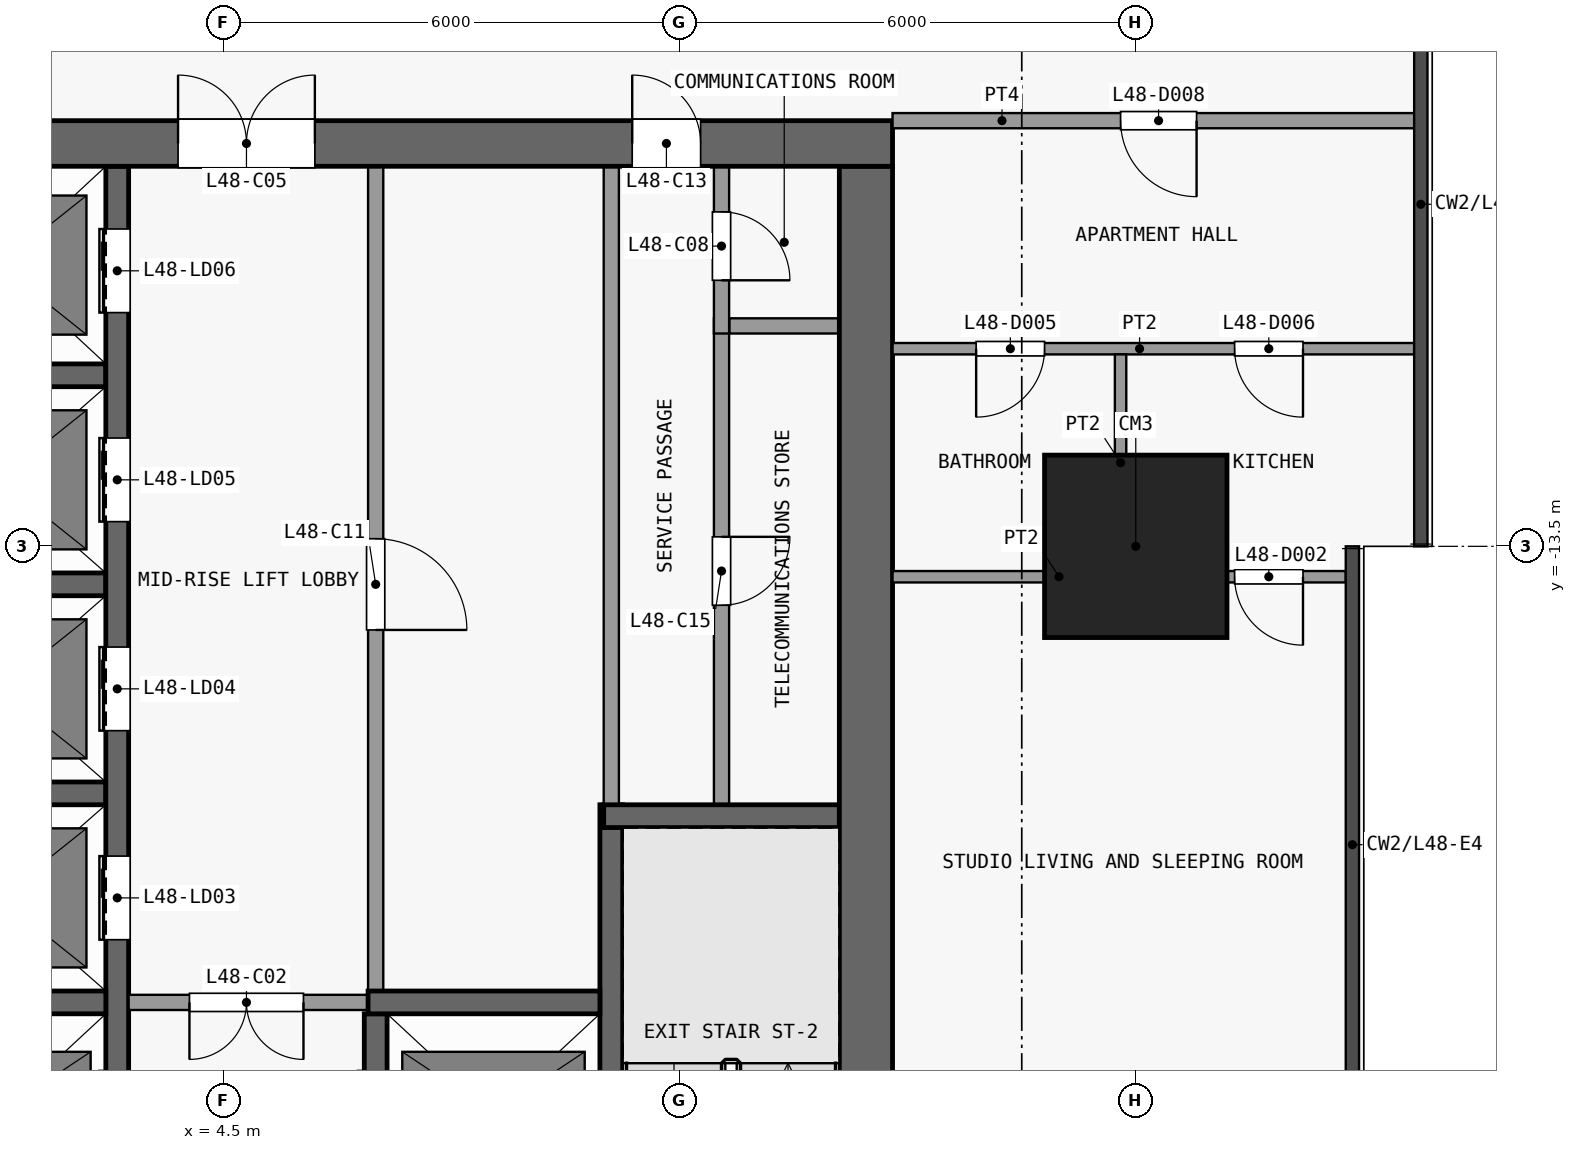
"""IFC4 building model, lengths in metres.
Left out: names, types, materials, properties, quantities, classifications, styles, units other than length and angle.
Written with IfcOpenShell. Run it as: python <this file> out.ifc"""

import sys

from ifc_helpers import new_model, si_unit, direction, frame, frame_2d, origin, origin_2d, place, context, subcontext, project, spatial, rectangle, extrude, element, fill, save


model = new_model("IFC4")
c1 = context("Model", 3, precision=1e-05, world=origin(), true_north=direction((0.0, 1.0)))
c2 = subcontext(c1, "Body", "Model", "MODEL_VIEW")
j1 = project(units=[si_unit("LENGTHUNIT", "METRE"), si_unit("PLANEANGLEUNIT", "RADIAN")], contexts=[c1])
p1 = place(None, origin())
s1 = spatial("IfcSite", under=j1, at=p1, CompositionType="ELEMENT")
p2 = place(p1, origin())
s2 = spatial("IfcBuilding", under=s1, at=p2, CompositionType="ELEMENT")
p3 = place(p2, frame((0.0, 0.0, 192.5)))
s3 = spatial("IfcBuildingStorey", under=s2, at=p3, CompositionType="ELEMENT", Elevation=192.5)
p4 = place(p3, frame((16.5, -13.5, 0.0), z_axis=(0.0, 0.0, 1.0), x_axis=(1.0, 0.0, 0.0)))
e1 = element("IfcColumn", 1, at=p4, inside=s3, PredefinedType="COLUMN", context=c2, shape_type="SweptSolid", body=[
    extrude(rectangle(XDim=2.4, YDim=2.4, at=origin_2d()), origin(), (0.0, 0.0, 1.0), 3.6),
])
p5 = place(p3, frame((-13.3, -8.2, 0.0), z_axis=(0.0, 0.0, 1.0), x_axis=(1.0, 0.0, 0.0)))
e2 = element("IfcWall", 2, at=p5, inside=s3, PredefinedType="SHEAR", context=c2, shape_type="SweptSolid", body=[
    extrude(rectangle(XDim=26.6, YDim=0.6, at=frame_2d((13.3, 0.0))), origin(), (0.0, 0.0, 1.0), 3.3),
])
p6 = place(p5, frame((7.6, 0.0, 0.0)))
e3 = element("IfcOpeningElement", 3, at=p6, cuts=e2, PredefinedType="OPENING", context=c2, shape_type="SweptSolid", body=[
    extrude(rectangle(XDim=1.8, YDim=2.1, at=frame_2d((0.9, 1.05))), frame((0.0, 0.31, 0.0), z_axis=(0.0, -1.0, 0.0), x_axis=(1.0, 0.0, 0.0)), (0.0, 0.0, 1.0), 0.62),
])
p7 = place(p5, frame((17.2, 0.0, 0.0)))
e4 = element("IfcOpeningElement", 4, at=p7, cuts=e2, PredefinedType="OPENING", context=c2, shape_type="SweptSolid", body=[
    extrude(rectangle(XDim=1.8, YDim=2.1, at=frame_2d((0.9, 1.05))), frame((0.0, 0.31, 0.0), z_axis=(0.0, -1.0, 0.0), x_axis=(1.0, 0.0, 0.0)), (0.0, 0.0, 1.0), 0.62),
])
p8 = place(p5, frame((2.525, 0.0, 0.0)))
e5 = element("IfcOpeningElement", 5, at=p8, cuts=e2, PredefinedType="OPENING", context=c2, shape_type="SweptSolid", body=[
    extrude(rectangle(XDim=0.9, YDim=2.1, at=frame_2d((0.45, 1.05))), frame((0.0, 0.31, 0.0), z_axis=(0.0, -1.0, 0.0), x_axis=(1.0, 0.0, 0.0)), (0.0, 0.0, 1.0), 0.62),
])
p9 = place(p5, frame((23.175, 0.0, 0.0)))
e6 = element("IfcOpeningElement", 6, at=p9, cuts=e2, PredefinedType="OPENING", context=c2, shape_type="SweptSolid", body=[
    extrude(rectangle(XDim=0.9, YDim=2.1, at=frame_2d((0.45, 1.05))), frame((0.0, 0.31, 0.0), z_axis=(0.0, -1.0, 0.0), x_axis=(1.0, 0.0, 0.0)), (0.0, 0.0, 1.0), 0.62),
])
p10 = place(p3, frame((12.95, -24.6, 0.0), z_axis=(0.0, 0.0, 1.0), x_axis=(0.0, 1.0, 0.0)))
e7 = element("IfcWall", 7, at=p10, inside=s3, PredefinedType="SHEAR", context=c2, shape_type="SweptSolid", body=[
    extrude(rectangle(XDim=16.1, YDim=0.7, at=frame_2d((8.05, 0.0))), origin(), (0.0, 0.0, 1.0), 3.3),
])
p11 = place(p3, frame((0.15, -19.5, 0.0), z_axis=(0.0, 0.0, 1.0), x_axis=(1.0, 0.0, 0.0)))
e8 = element("IfcWall", 8, at=p11, inside=s3, PredefinedType="SHEAR", context=c2, shape_type="SweptSolid", body=[
    extrude(rectangle(XDim=2.8, YDim=0.3, at=frame_2d((1.4, 0.0))), origin(), (0.0, 0.0, 1.0), 3.3),
])
p12 = place(p3, frame((6.4, -19.5, 0.0), z_axis=(0.0, 0.0, 1.0), x_axis=(-1.0, 0.0, 0.0)))
e9 = element("IfcWall", 9, at=p12, inside=s3, PredefinedType="PARTITIONING", context=c2, shape_type="SweptSolid", body=[
    extrude(rectangle(XDim=3.15, YDim=0.2, at=frame_2d((1.575, 0.0))), origin(), (0.0, 0.0, 1.0), 3.3),
])
p13 = place(p12, frame((0.85, 0.0, 0.0)))
e10 = element("IfcOpeningElement", 10, at=p13, cuts=e9, PredefinedType="OPENING", context=c2, shape_type="SweptSolid", body=[
    extrude(rectangle(XDim=1.5, YDim=2.1, at=frame_2d((0.75, 1.05))), frame((0.0, 0.11, 0.0), z_axis=(0.0, -1.0, 0.0), x_axis=(1.0, 0.0, 0.0)), (0.0, 0.0, 1.0), 0.22),
])
p14 = place(p3, frame((6.4, -19.5, 0.0), z_axis=(0.0, 0.0, 1.0), x_axis=(1.0, 0.0, 0.0)))
e11 = element("IfcWall", 11, at=p14, inside=s3, PredefinedType="SHEAR", context=c2, shape_type="SweptSolid", body=[
    extrude(rectangle(XDim=3.05, YDim=0.3, at=frame_2d((1.525, 0.0))), origin(), (0.0, 0.0, 1.0), 3.3),
])
p15 = place(p3, frame((9.5, -17.05, 0.0), z_axis=(0.0, 0.0, 1.0), x_axis=(1.0, 0.0, 0.0)))
e12 = element("IfcWall", 12, at=p15, inside=s3, PredefinedType="SHEAR", context=c2, shape_type="SweptSolid", body=[
    extrude(rectangle(XDim=3.1, YDim=0.3, at=frame_2d((1.55, 0.0))), origin(), (0.0, 0.0, 1.0), 3.3),
])
for number, where, z_axis, x_axis in (
    (13, (0.15, -16.75, 0.0), (0.0, 0.0, 1.0), (1.0, 0.0, 0.0)),
    (14, (0.15, -14.0, 0.0), (0.0, 0.0, 1.0), (1.0, 0.0, 0.0)),
    (15, (0.15, -11.25, 0.0), (0.0, 0.0, 1.0), (1.0, 0.0, 0.0)),
):
    element("IfcWall", number, at=place(p3, frame(where, z_axis=z_axis, x_axis=x_axis)), inside=s3, PredefinedType="SHEAR", context=c2, shape_type="SweptSolid", body=[
        extrude(rectangle(XDim=2.8, YDim=0.3, at=frame_2d((1.4, 0.0))), origin(), (0.0, 0.0, 1.0), 3.3),
    ])
p16 = place(p3, frame((11.15, -10.6, 0.0), z_axis=(0.0, 0.0, 1.0), x_axis=(1.0, 0.0, 0.0)))
e16 = element("IfcWall", 16, at=p16, inside=s3, PredefinedType="PARTITIONING", context=c2, shape_type="SweptSolid", body=[
    extrude(rectangle(XDim=1.45, YDim=0.2, at=frame_2d((0.725, 0.0))), origin(), (0.0, 0.0, 1.0), 3.3),
])
p17 = place(p3, frame((3.1, -22.55, 0.0), z_axis=(0.0, 0.0, 1.0), x_axis=(0.0, 1.0, 0.0)))
e17 = element("IfcWall", 17, at=p17, inside=s3, PredefinedType="SHEAR", context=c2, shape_type="SweptSolid", body=[
    extrude(rectangle(XDim=14.05, YDim=0.3, at=frame_2d((7.025, 0.0))), origin(), (0.0, 0.0, 1.0), 3.3),
])
p18 = place(p17, frame((1.05, 0.0, 0.0)))
e18 = element("IfcOpeningElement", 18, at=p18, cuts=e17, PredefinedType="OPENING", context=c2, shape_type="SweptSolid", body=[
    extrude(rectangle(XDim=1.1, YDim=2.1, at=frame_2d((0.55, 1.05))), frame((0.0, 0.16, 0.0), z_axis=(0.0, -1.0, 0.0), x_axis=(1.0, 0.0, 0.0)), (0.0, 0.0, 1.0), 0.32),
])
p19 = place(p17, frame((3.875, 0.0, 0.0)))
e19 = element("IfcOpeningElement", 19, at=p19, cuts=e17, PredefinedType="OPENING", context=c2, shape_type="SweptSolid", body=[
    extrude(rectangle(XDim=1.1, YDim=2.1, at=frame_2d((0.55, 1.05))), frame((0.0, 0.16, 0.0), z_axis=(0.0, -1.0, 0.0), x_axis=(1.0, 0.0, 0.0)), (0.0, 0.0, 1.0), 0.32),
])
p20 = place(p17, frame((6.625, 0.0, 0.0)))
e20 = element("IfcOpeningElement", 20, at=p20, cuts=e17, PredefinedType="OPENING", context=c2, shape_type="SweptSolid", body=[
    extrude(rectangle(XDim=1.1, YDim=2.1, at=frame_2d((0.55, 1.05))), frame((0.0, 0.16, 0.0), z_axis=(0.0, -1.0, 0.0), x_axis=(1.0, 0.0, 0.0)), (0.0, 0.0, 1.0), 0.32),
])
p21 = place(p17, frame((9.375, 0.0, 0.0)))
e21 = element("IfcOpeningElement", 21, at=p21, cuts=e17, PredefinedType="OPENING", context=c2, shape_type="SweptSolid", body=[
    extrude(rectangle(XDim=1.1, YDim=2.1, at=frame_2d((0.55, 1.05))), frame((0.0, 0.16, 0.0), z_axis=(0.0, -1.0, 0.0), x_axis=(1.0, 0.0, 0.0)), (0.0, 0.0, 1.0), 0.32),
])
p22 = place(p17, frame((12.125, 0.0, 0.0)))
e22 = element("IfcOpeningElement", 22, at=p22, cuts=e17, PredefinedType="OPENING", context=c2, shape_type="SweptSolid", body=[
    extrude(rectangle(XDim=1.1, YDim=2.1, at=frame_2d((0.55, 1.05))), frame((0.0, 0.16, 0.0), z_axis=(0.0, -1.0, 0.0), x_axis=(1.0, 0.0, 0.0)), (0.0, 0.0, 1.0), 0.32),
])
p23 = place(p3, frame((6.5, -22.25, 0.0), z_axis=(0.0, 0.0, 1.0), x_axis=(0.0, 1.0, 0.0)))
e23 = element("IfcWall", 23, at=p23, inside=s3, PredefinedType="SHEAR", context=c2, shape_type="SweptSolid", body=[
    extrude(rectangle(XDim=2.6, YDim=0.3, at=frame_2d((1.3, 0.0))), origin(), (0.0, 0.0, 1.0), 3.3),
])
p24 = place(p23, frame((0.75, 0.0, 0.0)))
e24 = element("IfcOpeningElement", 24, at=p24, cuts=e23, PredefinedType="OPENING", context=c2, shape_type="SweptSolid", body=[
    extrude(rectangle(XDim=1.1, YDim=2.1, at=frame_2d((0.55, 1.05))), frame((0.0, 0.16, 0.0), z_axis=(0.0, -1.0, 0.0), x_axis=(1.0, 0.0, 0.0)), (0.0, 0.0, 1.0), 0.32),
])
p25 = place(p3, frame((6.5, -8.5, 0.0), z_axis=(0.0, 0.0, 1.0), x_axis=(0.0, -1.0, 0.0)))
e25 = element("IfcWall", 25, at=p25, inside=s3, PredefinedType="PARTITIONING", context=c2, shape_type="SweptSolid", body=[
    extrude(rectangle(XDim=10.85, YDim=0.2, at=frame_2d((5.425, 0.0))), origin(), (0.0, 0.0, 1.0), 3.3),
])
p26 = place(p25, frame((4.9, 0.0, 0.0)))
e26 = element("IfcOpeningElement", 26, at=p26, cuts=e25, PredefinedType="OPENING", context=c2, shape_type="SweptSolid", body=[
    extrude(rectangle(XDim=1.2, YDim=2.1, at=frame_2d((0.6, 1.05))), frame((0.0, 0.11, 0.0), z_axis=(0.0, -1.0, 0.0), x_axis=(1.0, 0.0, 0.0)), (0.0, 0.0, 1.0), 0.22),
])
p27 = place(p3, frame((9.6, -16.9, 0.0), z_axis=(0.0, 0.0, 1.0), x_axis=(0.0, -1.0, 0.0)))
e27 = element("IfcWall", 27, at=p27, inside=s3, PredefinedType="SHEAR", context=c2, shape_type="SweptSolid", body=[
    extrude(rectangle(XDim=7.7, YDim=0.3, at=frame_2d((3.85, 0.0))), origin(), (0.0, 0.0, 1.0), 3.3),
])
p28 = place(p27, frame((6.5, 0.0, 0.0)))
e28 = element("IfcOpeningElement", 28, at=p28, cuts=e27, PredefinedType="OPENING", context=c2, shape_type="SweptSolid", body=[
    extrude(rectangle(XDim=1.1, YDim=2.1, at=frame_2d((0.55, 1.05))), frame((0.0, 0.16, 0.0), z_axis=(0.0, -1.0, 0.0), x_axis=(1.0, 0.0, 0.0)), (0.0, 0.0, 1.0), 0.32),
])
p29 = place(p3, frame((9.6, -16.9, 0.0), z_axis=(0.0, 0.0, 1.0), x_axis=(0.0, 1.0, 0.0)))
e29 = element("IfcWall", 29, at=p29, inside=s3, PredefinedType="PARTITIONING", context=c2, shape_type="SweptSolid", body=[
    extrude(rectangle(XDim=8.4, YDim=0.2, at=frame_2d((4.2, 0.0))), origin(), (0.0, 0.0, 1.0), 3.3),
])
p30 = place(p3, frame((11.05, -10.5, 0.0), z_axis=(0.0, 0.0, 1.0), x_axis=(0.0, -1.0, 0.0)))
e30 = element("IfcWall", 30, at=p30, inside=s3, PredefinedType="PARTITIONING", context=c2, shape_type="SweptSolid", body=[
    extrude(rectangle(XDim=6.4, YDim=0.2, at=frame_2d((3.2, 0.0))), origin(), (0.0, 0.0, 1.0), 3.3),
])
p31 = place(p30, frame((2.875, 0.0, 0.0)))
e31 = element("IfcOpeningElement", 31, at=p31, cuts=e30, PredefinedType="OPENING", context=c2, shape_type="SweptSolid", body=[
    extrude(rectangle(XDim=0.9, YDim=2.1, at=frame_2d((0.45, 1.05))), frame((0.0, 0.11, 0.0), z_axis=(0.0, -1.0, 0.0), x_axis=(1.0, 0.0, 0.0)), (0.0, 0.0, 1.0), 0.22),
])
p32 = place(p3, frame((11.05, -8.5, 0.0), z_axis=(0.0, 0.0, 1.0), x_axis=(0.0, -1.0, 0.0)))
e32 = element("IfcWall", 32, at=p32, inside=s3, PredefinedType="PARTITIONING", context=c2, shape_type="SweptSolid", body=[
    extrude(rectangle(XDim=2.2, YDim=0.2, at=frame_2d((1.1, 0.0))), origin(), (0.0, 0.0, 1.0), 3.3),
])
p33 = place(p32, frame((0.6, 0.0, 0.0)))
e33 = element("IfcOpeningElement", 33, at=p33, cuts=e32, PredefinedType="OPENING", context=c2, shape_type="SweptSolid", body=[
    extrude(rectangle(XDim=0.9, YDim=2.1, at=frame_2d((0.45, 1.05))), frame((0.0, 0.11, 0.0), z_axis=(0.0, -1.0, 0.0), x_axis=(1.0, 0.0, 0.0)), (0.0, 0.0, 1.0), 0.22),
])
p34 = place(p3, frame((13.3, -13.9, 0.0), z_axis=(0.0, 0.0, 1.0), x_axis=(1.0, 0.0, 0.0)))
e34 = element("IfcWall", 34, at=p34, inside=s3, PredefinedType="PARTITIONING", context=c2, shape_type="SweptSolid", body=[
    extrude(rectangle(XDim=5.962, YDim=0.15, at=frame_2d((2.981, 0.0))), origin(), (0.0, 0.0, 1.0), 3.3),
])
p35 = place(p34, frame((4.5, 0.0, 0.0)))
e35 = element("IfcOpeningElement", 35, at=p35, cuts=e34, PredefinedType="OPENING", context=c2, shape_type="SweptSolid", body=[
    extrude(rectangle(XDim=0.9, YDim=2.1, at=frame_2d((0.45, 1.05))), frame((0.0, 0.085, 0.0), z_axis=(0.0, -1.0, 0.0), x_axis=(1.0, 0.0, 0.0)), (0.0, 0.0, 1.0), 0.17),
])
p36 = place(p3, frame((13.3, -10.9, 0.0), z_axis=(0.0, 0.0, 1.0), x_axis=(1.0, 0.0, 0.0)))
e36 = element("IfcWall", 36, at=p36, inside=s3, PredefinedType="PARTITIONING", context=c2, shape_type="SweptSolid", body=[
    extrude(rectangle(XDim=6.863, YDim=0.15, at=frame_2d((3.431, 0.0))), origin(), (0.0, 0.0, 1.0), 3.3),
])
p37 = place(p36, frame((1.1, 0.0, 0.0)))
e37 = element("IfcOpeningElement", 37, at=p37, cuts=e36, PredefinedType="OPENING", context=c2, shape_type="SweptSolid", body=[
    extrude(rectangle(XDim=0.9, YDim=2.1, at=frame_2d((0.45, 1.05))), frame((0.0, 0.085, 0.0), z_axis=(0.0, -1.0, 0.0), x_axis=(1.0, 0.0, 0.0)), (0.0, 0.0, 1.0), 0.17),
])
p38 = place(p36, frame((4.5, 0.0, 0.0)))
e38 = element("IfcOpeningElement", 38, at=p38, cuts=e36, PredefinedType="OPENING", context=c2, shape_type="SweptSolid", body=[
    extrude(rectangle(XDim=0.9, YDim=2.1, at=frame_2d((0.45, 1.05))), frame((0.0, 0.085, 0.0), z_axis=(0.0, -1.0, 0.0), x_axis=(1.0, 0.0, 0.0)), (0.0, 0.0, 1.0), 0.17),
])
p39 = place(p3, frame((13.3, -7.9, 0.0), z_axis=(0.0, 0.0, 1.0), x_axis=(1.0, 0.0, 0.0)))
e39 = element("IfcWall", 39, at=p39, inside=s3, PredefinedType="PARTITIONING", context=c2, shape_type="SweptSolid", body=[
    extrude(rectangle(XDim=6.863, YDim=0.2, at=frame_2d((3.431, 0.0))), origin(), (0.0, 0.0, 1.0), 3.3),
])
p40 = place(p39, frame((3.0, 0.0, 0.0)))
e40 = element("IfcOpeningElement", 40, at=p40, cuts=e39, PredefinedType="OPENING", context=c2, shape_type="SweptSolid", body=[
    extrude(rectangle(XDim=1.0, YDim=2.1, at=frame_2d((0.5, 1.05))), frame((0.0, 0.11, 0.0), z_axis=(0.0, -1.0, 0.0), x_axis=(1.0, 0.0, 0.0)), (0.0, 0.0, 1.0), 0.22),
])
p41 = place(p3, frame((16.3, -13.825, 0.0), z_axis=(0.0, 0.0, 1.0), x_axis=(0.0, 1.0, 0.0)))
e41 = element("IfcWall", 41, at=p41, inside=s3, PredefinedType="PARTITIONING", context=c2, shape_type="SweptSolid", body=[
    extrude(rectangle(XDim=2.85, YDim=0.15, at=frame_2d((1.425, 0.0))), origin(), (0.0, 0.0, 1.0), 3.3),
])
p42 = place(p19, origin())
e42 = element("IfcDoor", 42, at=p42, inside=s3, OperationType="DOUBLE_DOOR_SLIDING", PredefinedType="DOOR", context=c2, shape_type="SweptSolid", body=[
    extrude(rectangle(XDim=1.1, YDim=2.1, at=frame_2d((0.55, 1.05))), frame((0.0, 0.025, 0.0), z_axis=(0.0, -1.0, 0.0), x_axis=(1.0, 0.0, 0.0)), (0.0, 0.0, 1.0), 0.05),
])
fill(e19, e42)
p43 = place(p20, origin())
e43 = element("IfcDoor", 43, at=p43, inside=s3, OperationType="DOUBLE_DOOR_SLIDING", PredefinedType="DOOR", context=c2, shape_type="SweptSolid", body=[
    extrude(rectangle(XDim=1.1, YDim=2.1, at=frame_2d((0.55, 1.05))), frame((0.0, 0.025, 0.0), z_axis=(0.0, -1.0, 0.0), x_axis=(1.0, 0.0, 0.0)), (0.0, 0.0, 1.0), 0.05),
])
fill(e20, e43)
p44 = place(p21, origin())
e44 = element("IfcDoor", 44, at=p44, inside=s3, OperationType="DOUBLE_DOOR_SLIDING", PredefinedType="DOOR", context=c2, shape_type="SweptSolid", body=[
    extrude(rectangle(XDim=1.1, YDim=2.1, at=frame_2d((0.55, 1.05))), frame((0.0, 0.025, 0.0), z_axis=(0.0, -1.0, 0.0), x_axis=(1.0, 0.0, 0.0)), (0.0, 0.0, 1.0), 0.05),
])
fill(e21, e44)
p45 = place(p22, origin())
e45 = element("IfcDoor", 45, at=p45, inside=s3, OperationType="DOUBLE_DOOR_SLIDING", PredefinedType="DOOR", context=c2, shape_type="SweptSolid", body=[
    extrude(rectangle(XDim=1.1, YDim=2.1, at=frame_2d((0.55, 1.05))), frame((0.0, 0.025, 0.0), z_axis=(0.0, -1.0, 0.0), x_axis=(1.0, 0.0, 0.0)), (0.0, 0.0, 1.0), 0.05),
])
fill(e22, e45)
p46 = place(p13, origin())
e46 = element("IfcDoor", 46, at=p46, inside=s3, OperationType="DOUBLE_DOOR_SINGLE_SWING", PredefinedType="DOOR", context=c2, shape_type="SweptSolid", body=[
    extrude(rectangle(XDim=1.5, YDim=2.1, at=frame_2d((0.75, 1.05))), frame((0.0, 0.025, 0.0), z_axis=(0.0, -1.0, 0.0), x_axis=(1.0, 0.0, 0.0)), (0.0, 0.0, 1.0), 0.05),
])
fill(e10, e46)
p47 = place(p7, origin())
e47 = element("IfcDoor", 47, at=p47, inside=s3, OperationType="DOUBLE_DOOR_SINGLE_SWING", PredefinedType="DOOR", context=c2, shape_type="SweptSolid", body=[
    extrude(rectangle(XDim=1.8, YDim=2.1, at=frame_2d((0.9, 1.05))), frame((0.0, 0.025, 0.0), z_axis=(0.0, -1.0, 0.0), x_axis=(1.0, 0.0, 0.0)), (0.0, 0.0, 1.0), 0.05),
])
fill(e4, e47)
p48 = place(p33, origin())
e48 = element("IfcDoor", 48, at=p48, inside=s3, OperationType="SINGLE_SWING_RIGHT", PredefinedType="DOOR", context=c2, shape_type="SweptSolid", body=[
    extrude(rectangle(XDim=0.9, YDim=2.1, at=frame_2d((0.45, 1.05))), frame((0.0, 0.025, 0.0), z_axis=(0.0, -1.0, 0.0), x_axis=(1.0, 0.0, 0.0)), (0.0, 0.0, 1.0), 0.05),
])
fill(e33, e48)
p49 = place(p26, origin())
e49 = element("IfcDoor", 49, at=p49, inside=s3, OperationType="SINGLE_SWING_RIGHT", PredefinedType="DOOR", context=c2, shape_type="SweptSolid", body=[
    extrude(rectangle(XDim=1.2, YDim=2.1, at=frame_2d((0.6, 1.05))), frame((0.0, 0.025, 0.0), z_axis=(0.0, -1.0, 0.0), x_axis=(1.0, 0.0, 0.0)), (0.0, 0.0, 1.0), 0.05),
])
fill(e26, e49)
p50 = place(p9, origin())
e50 = element("IfcDoor", 50, at=p50, inside=s3, OperationType="SINGLE_SWING_LEFT", PredefinedType="DOOR", context=c2, shape_type="SweptSolid", body=[
    extrude(rectangle(XDim=0.9, YDim=2.1, at=frame_2d((0.45, 1.05))), frame((0.0, 0.025, 0.0), z_axis=(0.0, -1.0, 0.0), x_axis=(1.0, 0.0, 0.0)), (0.0, 0.0, 1.0), 0.05),
])
fill(e6, e50)
p51 = place(p31, origin())
e51 = element("IfcDoor", 51, at=p51, inside=s3, OperationType="SINGLE_SWING_LEFT", PredefinedType="DOOR", context=c2, shape_type="SweptSolid", body=[
    extrude(rectangle(XDim=0.9, YDim=2.1, at=frame_2d((0.45, 1.05))), frame((0.0, 0.025, 0.0), z_axis=(0.0, -1.0, 0.0), x_axis=(1.0, 0.0, 0.0)), (0.0, 0.0, 1.0), 0.05),
])
fill(e31, e51)
p52 = place(p35, origin())
e52 = element("IfcDoor", 52, at=p52, inside=s3, OperationType="SINGLE_SWING_RIGHT", PredefinedType="DOOR", context=c2, shape_type="SweptSolid", body=[
    extrude(rectangle(XDim=0.9, YDim=2.1, at=frame_2d((0.45, 1.05))), frame((0.0, 0.025, 0.0), z_axis=(0.0, -1.0, 0.0), x_axis=(1.0, 0.0, 0.0)), (0.0, 0.0, 1.0), 0.05),
])
fill(e35, e52)
p53 = place(p37, origin())
e53 = element("IfcDoor", 53, at=p53, inside=s3, OperationType="SINGLE_SWING_LEFT", PredefinedType="DOOR", context=c2, shape_type="SweptSolid", body=[
    extrude(rectangle(XDim=0.9, YDim=2.1, at=frame_2d((0.45, 1.05))), frame((0.0, 0.025, 0.0), z_axis=(0.0, -1.0, 0.0), x_axis=(1.0, 0.0, 0.0)), (0.0, 0.0, 1.0), 0.05),
])
fill(e37, e53)
p54 = place(p38, origin())
e54 = element("IfcDoor", 54, at=p54, inside=s3, OperationType="SINGLE_SWING_RIGHT", PredefinedType="DOOR", context=c2, shape_type="SweptSolid", body=[
    extrude(rectangle(XDim=0.9, YDim=2.1, at=frame_2d((0.45, 1.05))), frame((0.0, 0.025, 0.0), z_axis=(0.0, -1.0, 0.0), x_axis=(1.0, 0.0, 0.0)), (0.0, 0.0, 1.0), 0.05),
])
fill(e38, e54)
p55 = place(p40, origin())
e55 = element("IfcDoor", 55, at=p55, inside=s3, OperationType="SINGLE_SWING_RIGHT", PredefinedType="DOOR", context=c2, shape_type="SweptSolid", body=[
    extrude(rectangle(XDim=1.0, YDim=2.1, at=frame_2d((0.5, 1.05))), frame((0.0, 0.025, 0.0), z_axis=(0.0, -1.0, 0.0), x_axis=(1.0, 0.0, 0.0)), (0.0, 0.0, 1.0), 0.05),
])
fill(e40, e55)
save(model, sys.argv[1])
